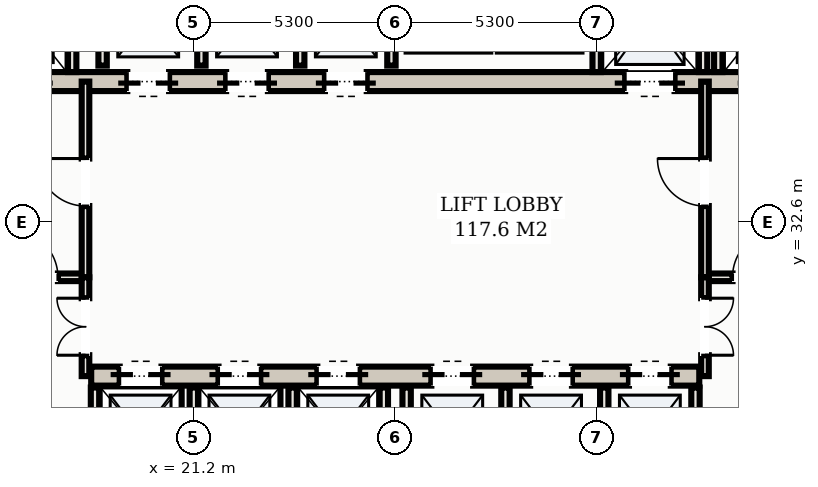
"""IFC4 building model, lengths in metres.
Left out: names, types, materials, properties, quantities, classifications, styles, units other than length and angle.
Written with IfcOpenShell. Run it as: python <this file> out.ifc"""

import sys

from ifc_helpers import new_model, si_unit, direction, frame, frame_2d, origin, place, context, subcontext, project, spatial, rectangle, extrude, element, fill, save


model = new_model("IFC4")
c1 = context("Model", 3, precision=1e-05, world=origin(), true_north=direction((0.0, 1.0)))
c2 = subcontext(c1, "Body", "Model", "MODEL_VIEW")
j1 = project(units=[si_unit("LENGTHUNIT", "METRE"), si_unit("PLANEANGLEUNIT", "RADIAN")], contexts=[c1])
p1 = place(None, origin())
s1 = spatial("IfcSite", under=j1, at=p1, CompositionType="ELEMENT")
p2 = place(p1, origin())
s2 = spatial("IfcBuilding", under=s1, at=p2, CompositionType="ELEMENT")
p3 = place(p2, origin())
s3 = spatial("IfcBuildingStorey", under=s2, at=p3, CompositionType="ELEMENT", Elevation=0.0)
p4 = place(p3, frame((15.5, 36.3, 0.0), z_axis=(0.0, 0.0, 1.0), x_axis=(1.0, 0.0, 0.0)))
e1 = element("IfcWall", 1, at=p4, inside=s3, PredefinedType="SHEAR", context=c2, shape_type="SweptSolid", body=[
    extrude(rectangle(XDim=22.0, YDim=0.5, at=frame_2d((11.0, 0.0))), origin(), (0.0, 0.0, 1.0), 4.95),
])
p5 = place(p4, frame((0.65, 0.0, 0.0)))
e2 = element("IfcOpeningElement", 2, at=p5, cuts=e1, PredefinedType="OPENING", context=c2, shape_type="SweptSolid", body=[
    extrude(rectangle(XDim=1.1, YDim=2.15, at=frame_2d((0.55, 1.075))), frame((0.0, 0.26, 0.0), z_axis=(0.0, -1.0, 0.0), x_axis=(1.0, 0.0, 0.0)), (0.0, 0.0, 1.0), 0.52),
])
p6 = place(p4, frame((20.25, 0.0, 0.0)))
e3 = element("IfcOpeningElement", 3, at=p6, cuts=e1, PredefinedType="OPENING", context=c2, shape_type="SweptSolid", body=[
    extrude(rectangle(XDim=1.1, YDim=2.15, at=frame_2d((0.55, 1.075))), frame((0.0, 0.26, 0.0), z_axis=(0.0, -1.0, 0.0), x_axis=(1.0, 0.0, 0.0)), (0.0, 0.0, 1.0), 0.52),
])
p7 = place(p4, frame((17.05, 0.0, 0.0)))
e4 = element("IfcOpeningElement", 4, at=p7, cuts=e1, PredefinedType="OPENING", context=c2, shape_type="SweptSolid", body=[
    extrude(rectangle(XDim=1.3, YDim=2.2, at=frame_2d((0.65, 1.1))), frame((0.0, 0.26, 0.0), z_axis=(0.0, -1.0, 0.0), x_axis=(1.0, 0.0, 0.0)), (0.0, 0.0, 1.0), 0.52),
])
p8 = place(p4, frame((3.95, 0.0, 0.0)))
e5 = element("IfcOpeningElement", 5, at=p8, cuts=e1, PredefinedType="OPENING", context=c2, shape_type="SweptSolid", body=[
    extrude(rectangle(XDim=1.1, YDim=2.15, at=frame_2d((0.55, 1.075))), frame((0.0, 0.26, 0.0), z_axis=(0.0, -1.0, 0.0), x_axis=(1.0, 0.0, 0.0)), (0.0, 0.0, 1.0), 0.52),
])
p9 = place(p4, frame((6.55, 0.0, 0.0)))
e6 = element("IfcOpeningElement", 6, at=p9, cuts=e1, PredefinedType="OPENING", context=c2, shape_type="SweptSolid", body=[
    extrude(rectangle(XDim=1.1, YDim=2.15, at=frame_2d((0.55, 1.075))), frame((0.0, 0.26, 0.0), z_axis=(0.0, -1.0, 0.0), x_axis=(1.0, 0.0, 0.0)), (0.0, 0.0, 1.0), 0.52),
])
p10 = place(p4, frame((9.15, 0.0, 0.0)))
e7 = element("IfcOpeningElement", 7, at=p10, cuts=e1, PredefinedType="OPENING", context=c2, shape_type="SweptSolid", body=[
    extrude(rectangle(XDim=1.1, YDim=2.15, at=frame_2d((0.55, 1.075))), frame((0.0, 0.26, 0.0), z_axis=(0.0, -1.0, 0.0), x_axis=(1.0, 0.0, 0.0)), (0.0, 0.0, 1.0), 0.52),
])
p11 = place(p3, frame((18.5, 28.55, 0.0), z_axis=(0.0, 0.0, 1.0), x_axis=(1.0, 0.0, 0.0)))
e8 = element("IfcWall", 8, at=p11, inside=s3, PredefinedType="SHEAR", context=c2, shape_type="SweptSolid", body=[
    extrude(rectangle(XDim=16.0, YDim=0.5, at=frame_2d((8.0, 0.0))), origin(), (0.0, 0.0, 1.0), 4.95),
])
p12 = place(p11, frame((0.75, 0.0, 0.0)))
e9 = element("IfcOpeningElement", 9, at=p12, cuts=e8, PredefinedType="OPENING", context=c2, shape_type="SweptSolid", body=[
    extrude(rectangle(XDim=1.1, YDim=2.15, at=frame_2d((0.55, 1.075))), frame((0.0, 0.26, 0.0), z_axis=(0.0, -1.0, 0.0), x_axis=(1.0, 0.0, 0.0)), (0.0, 0.0, 1.0), 0.52),
])
p13 = place(p11, frame((3.35, 0.0, 0.0)))
e10 = element("IfcOpeningElement", 10, at=p13, cuts=e8, PredefinedType="OPENING", context=c2, shape_type="SweptSolid", body=[
    extrude(rectangle(XDim=1.1, YDim=2.15, at=frame_2d((0.55, 1.075))), frame((0.0, 0.26, 0.0), z_axis=(0.0, -1.0, 0.0), x_axis=(1.0, 0.0, 0.0)), (0.0, 0.0, 1.0), 0.52),
])
p14 = place(p11, frame((5.95, 0.0, 0.0)))
e11 = element("IfcOpeningElement", 11, at=p14, cuts=e8, PredefinedType="OPENING", context=c2, shape_type="SweptSolid", body=[
    extrude(rectangle(XDim=1.1, YDim=2.15, at=frame_2d((0.55, 1.075))), frame((0.0, 0.26, 0.0), z_axis=(0.0, -1.0, 0.0), x_axis=(1.0, 0.0, 0.0)), (0.0, 0.0, 1.0), 0.52),
])
p15 = place(p11, frame((8.95, 0.0, 0.0)))
e12 = element("IfcOpeningElement", 12, at=p15, cuts=e8, PredefinedType="OPENING", context=c2, shape_type="SweptSolid", body=[
    extrude(rectangle(XDim=1.1, YDim=2.15, at=frame_2d((0.55, 1.075))), frame((0.0, 0.26, 0.0), z_axis=(0.0, -1.0, 0.0), x_axis=(1.0, 0.0, 0.0)), (0.0, 0.0, 1.0), 0.52),
])
p16 = place(p11, frame((11.55, 0.0, 0.0)))
e13 = element("IfcOpeningElement", 13, at=p16, cuts=e8, PredefinedType="OPENING", context=c2, shape_type="SweptSolid", body=[
    extrude(rectangle(XDim=1.1, YDim=2.15, at=frame_2d((0.55, 1.075))), frame((0.0, 0.26, 0.0), z_axis=(0.0, -1.0, 0.0), x_axis=(1.0, 0.0, 0.0)), (0.0, 0.0, 1.0), 0.52),
])
p17 = place(p11, frame((14.15, 0.0, 0.0)))
e14 = element("IfcOpeningElement", 14, at=p17, cuts=e8, PredefinedType="OPENING", context=c2, shape_type="SweptSolid", body=[
    extrude(rectangle(XDim=1.1, YDim=2.15, at=frame_2d((0.55, 1.075))), frame((0.0, 0.26, 0.0), z_axis=(0.0, -1.0, 0.0), x_axis=(1.0, 0.0, 0.0)), (0.0, 0.0, 1.0), 0.52),
])
for number, where, z_axis, x_axis in (
    (15, (18.0, 36.55, 0.0), (0.0, 0.0, 1.0), (0.0, 1.0, 0.0)),
    (16, (35.0, 36.55, 0.0), (0.0, 0.0, 1.0), (0.0, 1.0, 0.0)),
    (17, (31.8, 36.55, 0.0), (0.0, 0.0, 1.0), (0.0, 1.0, 0.0)),
    (18, (34.6, 36.55, 0.0), (0.0, 0.0, 1.0), (0.0, 1.0, 0.0)),
):
    element("IfcWall", number, at=place(p3, frame(where, z_axis=z_axis, x_axis=x_axis)), inside=s3, PredefinedType="SOLIDWALL", context=c2, shape_type="SweptSolid", body=[
        extrude(rectangle(XDim=2.93, YDim=0.22, at=frame_2d((1.465, 0.0))), origin(), (0.0, 0.0, 1.0), 4.95),
    ])
for number, where, z_axis, x_axis in (
    (19, (18.6, 25.72, 0.0), (0.0, 0.0, 1.0), (0.0, 1.0, 0.0)),
    (20, (21.2, 25.72, 0.0), (0.0, 0.0, 1.0), (0.0, 1.0, 0.0)),
    (21, (23.8, 25.72, 0.0), (0.0, 0.0, 1.0), (0.0, 1.0, 0.0)),
    (22, (26.2, 25.72, 0.0), (0.0, 0.0, 1.0), (0.0, 1.0, 0.0)),
    (23, (26.8, 25.72, 0.0), (0.0, 0.0, 1.0), (0.0, 1.0, 0.0)),
    (24, (29.4, 25.72, 0.0), (0.0, 0.0, 1.0), (0.0, 1.0, 0.0)),
    (25, (32.0, 25.72, 0.0), (0.0, 0.0, 1.0), (0.0, 1.0, 0.0)),
    (26, (34.4, 25.72, 0.0), (0.0, 0.0, 1.0), (0.0, 1.0, 0.0)),
):
    element("IfcWall", number, at=place(p3, frame(where, z_axis=z_axis, x_axis=x_axis)), inside=s3, PredefinedType="SOLIDWALL", context=c2, shape_type="SweptSolid", body=[
        extrude(rectangle(XDim=2.53, YDim=0.22, at=frame_2d((1.265, 0.0))), origin(), (0.0, 0.0, 1.0), 4.95),
    ])
for number, where, z_axis, x_axis in (
    (27, (18.8, 36.72, 0.0), (0.0, 0.0, 1.0), (0.0, 1.0, 0.0)),
    (28, (21.4, 36.72, 0.0), (0.0, 0.0, 1.0), (0.0, 1.0, 0.0)),
    (29, (24.0, 36.72, 0.0), (0.0, 0.0, 1.0), (0.0, 1.0, 0.0)),
    (30, (26.4, 36.72, 0.0), (0.0, 0.0, 1.0), (0.0, 1.0, 0.0)),
):
    element("IfcWall", number, at=place(p3, frame(where, z_axis=z_axis, x_axis=x_axis)), inside=s3, PredefinedType="SOLIDWALL", context=c2, shape_type="SweptSolid", body=[
        extrude(rectangle(XDim=2.56, YDim=0.22, at=frame_2d((1.28, 0.0))), origin(), (0.0, 0.0, 1.0), 4.95),
    ])
p18 = place(p3, frame((15.1, 31.15, 0.0), z_axis=(0.0, 0.0, 1.0), x_axis=(1.0, 0.0, 0.0)))
e31 = element("IfcWall", 31, at=p18, inside=s3, PredefinedType="PARTITIONING", context=c2, shape_type="SweptSolid", body=[
    extrude(rectangle(XDim=3.25, YDim=0.2, at=frame_2d((1.625, 0.0))), origin(), (0.0, 0.0, 1.0), 4.95),
])
p19 = place(p18, frame((1.275, 0.0, 0.0)))
e32 = element("IfcOpeningElement", 32, at=p19, cuts=e31, PredefinedType="OPENING", context=c2, shape_type="SweptSolid", body=[
    extrude(rectangle(XDim=1.25, YDim=2.2, at=frame_2d((0.625, 1.1))), frame((0.0, 0.11, 0.0), z_axis=(0.0, -1.0, 0.0), x_axis=(1.0, 0.0, 0.0)), (0.0, 0.0, 1.0), 0.22),
])
p20 = place(p3, frame((18.35, 31.15, 0.0), z_axis=(0.0, 0.0, 1.0), x_axis=(0.0, 1.0, 0.0)))
e33 = element("IfcWall", 33, at=p20, inside=s3, PredefinedType="PARTITIONING", context=c2, shape_type="SweptSolid", body=[
    extrude(rectangle(XDim=5.15, YDim=0.2, at=frame_2d((2.575, 0.0))), origin(), (0.0, 0.0, 1.0), 4.95),
])
p21 = place(p20, frame((1.875, 0.0, 0.0)))
e34 = element("IfcOpeningElement", 34, at=p21, cuts=e33, PredefinedType="OPENING", context=c2, shape_type="SweptSolid", body=[
    extrude(rectangle(XDim=1.25, YDim=2.2, at=frame_2d((0.625, 1.1))), frame((0.0, 0.11, 0.0), z_axis=(0.0, -1.0, 0.0), x_axis=(1.0, 0.0, 0.0)), (0.0, 0.0, 1.0), 0.22),
])
p22 = place(p3, frame((34.65, 31.15, 0.0), z_axis=(0.0, 0.0, 1.0), x_axis=(1.0, 0.0, 0.0)))
e35 = element("IfcWall", 35, at=p22, inside=s3, PredefinedType="PARTITIONING", context=c2, shape_type="SweptSolid", body=[
    extrude(rectangle(XDim=3.25, YDim=0.2, at=frame_2d((1.625, 0.0))), origin(), (0.0, 0.0, 1.0), 4.95),
])
p23 = place(p22, frame((0.725, 0.0, 0.0)))
e36 = element("IfcOpeningElement", 36, at=p23, cuts=e35, PredefinedType="OPENING", context=c2, shape_type="SweptSolid", body=[
    extrude(rectangle(XDim=1.25, YDim=2.2, at=frame_2d((0.625, 1.1))), frame((0.0, 0.11, 0.0), z_axis=(0.0, -1.0, 0.0), x_axis=(1.0, 0.0, 0.0)), (0.0, 0.0, 1.0), 0.22),
])
p24 = place(p3, frame((34.65, 31.15, 0.0), z_axis=(0.0, 0.0, 1.0), x_axis=(0.0, 1.0, 0.0)))
e37 = element("IfcWall", 37, at=p24, inside=s3, PredefinedType="PARTITIONING", context=c2, shape_type="SweptSolid", body=[
    extrude(rectangle(XDim=5.15, YDim=0.2, at=frame_2d((2.575, 0.0))), origin(), (0.0, 0.0, 1.0), 4.95),
])
p25 = place(p24, frame((1.875, 0.0, 0.0)))
e38 = element("IfcOpeningElement", 38, at=p25, cuts=e37, PredefinedType="OPENING", context=c2, shape_type="SweptSolid", body=[
    extrude(rectangle(XDim=1.25, YDim=2.2, at=frame_2d((0.625, 1.1))), frame((0.0, 0.11, 0.0), z_axis=(0.0, -1.0, 0.0), x_axis=(1.0, 0.0, 0.0)), (0.0, 0.0, 1.0), 0.22),
])
p26 = place(p3, frame((18.35, 28.55, 0.0), z_axis=(0.0, 0.0, 1.0), x_axis=(0.0, 1.0, 0.0)))
e39 = element("IfcWall", 39, at=p26, inside=s3, PredefinedType="PARTITIONING", context=c2, shape_type="SweptSolid", body=[
    extrude(rectangle(XDim=2.6, YDim=0.2, at=frame_2d((1.3, 0.0))), origin(), (0.0, 0.0, 1.0), 4.95),
])
p27 = place(p26, frame((0.55, 0.0, 0.0)))
e40 = element("IfcOpeningElement", 40, at=p27, cuts=e39, PredefinedType="OPENING", context=c2, shape_type="SweptSolid", body=[
    extrude(rectangle(XDim=1.5, YDim=2.25, at=frame_2d((0.75, 1.125))), frame((0.0, 0.11, 0.0), z_axis=(0.0, -1.0, 0.0), x_axis=(1.0, 0.0, 0.0)), (0.0, 0.0, 1.0), 0.22),
])
p28 = place(p3, frame((34.65, 28.55, 0.0), z_axis=(0.0, 0.0, 1.0), x_axis=(0.0, 1.0, 0.0)))
e41 = element("IfcWall", 41, at=p28, inside=s3, PredefinedType="PARTITIONING", context=c2, shape_type="SweptSolid", body=[
    extrude(rectangle(XDim=2.6, YDim=0.2, at=frame_2d((1.3, 0.0))), origin(), (0.0, 0.0, 1.0), 4.95),
])
p29 = place(p28, frame((0.55, 0.0, 0.0)))
e42 = element("IfcOpeningElement", 42, at=p29, cuts=e41, PredefinedType="OPENING", context=c2, shape_type="SweptSolid", body=[
    extrude(rectangle(XDim=1.5, YDim=2.25, at=frame_2d((0.75, 1.125))), frame((0.0, 0.11, 0.0), z_axis=(0.0, -1.0, 0.0), x_axis=(1.0, 0.0, 0.0)), (0.0, 0.0, 1.0), 0.22),
])
p30 = place(p7, frame((1.3, 0.0, 0.0), z_axis=(0.0, 0.0, 1.0), x_axis=(-1.0, 0.0, 0.0)))
e43 = element("IfcDoor", 43, at=p30, inside=s3, OperationType="DOUBLE_DOOR_SLIDING", PredefinedType="DOOR", context=c2, shape_type="SweptSolid", body=[
    extrude(rectangle(XDim=1.3, YDim=2.2, at=frame_2d((0.65, 1.1))), frame((0.0, 0.025, 0.0), z_axis=(0.0, -1.0, 0.0), x_axis=(1.0, 0.0, 0.0)), (0.0, 0.0, 1.0), 0.05),
])
fill(e4, e43)
p31 = place(p12, origin())
e44 = element("IfcDoor", 44, at=p31, inside=s3, OperationType="DOUBLE_DOOR_SLIDING", PredefinedType="DOOR", context=c2, shape_type="SweptSolid", body=[
    extrude(rectangle(XDim=1.1, YDim=2.15, at=frame_2d((0.55, 1.075))), frame((0.0, 0.025, 0.0), z_axis=(0.0, -1.0, 0.0), x_axis=(1.0, 0.0, 0.0)), (0.0, 0.0, 1.0), 0.05),
])
fill(e9, e44)
p32 = place(p13, origin())
e45 = element("IfcDoor", 45, at=p32, inside=s3, OperationType="DOUBLE_DOOR_SLIDING", PredefinedType="DOOR", context=c2, shape_type="SweptSolid", body=[
    extrude(rectangle(XDim=1.1, YDim=2.15, at=frame_2d((0.55, 1.075))), frame((0.0, 0.025, 0.0), z_axis=(0.0, -1.0, 0.0), x_axis=(1.0, 0.0, 0.0)), (0.0, 0.0, 1.0), 0.05),
])
fill(e10, e45)
p33 = place(p14, origin())
e46 = element("IfcDoor", 46, at=p33, inside=s3, OperationType="DOUBLE_DOOR_SLIDING", PredefinedType="DOOR", context=c2, shape_type="SweptSolid", body=[
    extrude(rectangle(XDim=1.1, YDim=2.15, at=frame_2d((0.55, 1.075))), frame((0.0, 0.025, 0.0), z_axis=(0.0, -1.0, 0.0), x_axis=(1.0, 0.0, 0.0)), (0.0, 0.0, 1.0), 0.05),
])
fill(e11, e46)
p34 = place(p15, origin())
e47 = element("IfcDoor", 47, at=p34, inside=s3, OperationType="DOUBLE_DOOR_SLIDING", PredefinedType="DOOR", context=c2, shape_type="SweptSolid", body=[
    extrude(rectangle(XDim=1.1, YDim=2.15, at=frame_2d((0.55, 1.075))), frame((0.0, 0.025, 0.0), z_axis=(0.0, -1.0, 0.0), x_axis=(1.0, 0.0, 0.0)), (0.0, 0.0, 1.0), 0.05),
])
fill(e12, e47)
p35 = place(p16, origin())
e48 = element("IfcDoor", 48, at=p35, inside=s3, OperationType="DOUBLE_DOOR_SLIDING", PredefinedType="DOOR", context=c2, shape_type="SweptSolid", body=[
    extrude(rectangle(XDim=1.1, YDim=2.15, at=frame_2d((0.55, 1.075))), frame((0.0, 0.025, 0.0), z_axis=(0.0, -1.0, 0.0), x_axis=(1.0, 0.0, 0.0)), (0.0, 0.0, 1.0), 0.05),
])
fill(e13, e48)
p36 = place(p17, origin())
e49 = element("IfcDoor", 49, at=p36, inside=s3, OperationType="DOUBLE_DOOR_SLIDING", PredefinedType="DOOR", context=c2, shape_type="SweptSolid", body=[
    extrude(rectangle(XDim=1.1, YDim=2.15, at=frame_2d((0.55, 1.075))), frame((0.0, 0.025, 0.0), z_axis=(0.0, -1.0, 0.0), x_axis=(1.0, 0.0, 0.0)), (0.0, 0.0, 1.0), 0.05),
])
fill(e14, e49)
p37 = place(p8, frame((1.1, 0.0, 0.0), z_axis=(0.0, 0.0, 1.0), x_axis=(-1.0, 0.0, 0.0)))
e50 = element("IfcDoor", 50, at=p37, inside=s3, OperationType="DOUBLE_DOOR_SLIDING", PredefinedType="DOOR", context=c2, shape_type="SweptSolid", body=[
    extrude(rectangle(XDim=1.1, YDim=2.15, at=frame_2d((0.55, 1.075))), frame((0.0, 0.025, 0.0), z_axis=(0.0, -1.0, 0.0), x_axis=(1.0, 0.0, 0.0)), (0.0, 0.0, 1.0), 0.05),
])
fill(e5, e50)
p38 = place(p9, frame((1.1, 0.0, 0.0), z_axis=(0.0, 0.0, 1.0), x_axis=(-1.0, 0.0, 0.0)))
e51 = element("IfcDoor", 51, at=p38, inside=s3, OperationType="DOUBLE_DOOR_SLIDING", PredefinedType="DOOR", context=c2, shape_type="SweptSolid", body=[
    extrude(rectangle(XDim=1.1, YDim=2.15, at=frame_2d((0.55, 1.075))), frame((0.0, 0.025, 0.0), z_axis=(0.0, -1.0, 0.0), x_axis=(1.0, 0.0, 0.0)), (0.0, 0.0, 1.0), 0.05),
])
fill(e6, e51)
p39 = place(p10, frame((1.1, 0.0, 0.0), z_axis=(0.0, 0.0, 1.0), x_axis=(-1.0, 0.0, 0.0)))
e52 = element("IfcDoor", 52, at=p39, inside=s3, OperationType="DOUBLE_DOOR_SLIDING", PredefinedType="DOOR", context=c2, shape_type="SweptSolid", body=[
    extrude(rectangle(XDim=1.1, YDim=2.15, at=frame_2d((0.55, 1.075))), frame((0.0, 0.025, 0.0), z_axis=(0.0, -1.0, 0.0), x_axis=(1.0, 0.0, 0.0)), (0.0, 0.0, 1.0), 0.05),
])
fill(e7, e52)
p40 = place(p19, origin())
e53 = element("IfcDoor", 53, at=p40, inside=s3, OperationType="SINGLE_SWING_LEFT", PredefinedType="DOOR", context=c2, shape_type="SweptSolid", body=[
    extrude(rectangle(XDim=1.25, YDim=2.2, at=frame_2d((0.625, 1.1))), frame((0.0, 0.025, 0.0), z_axis=(0.0, -1.0, 0.0), x_axis=(1.0, 0.0, 0.0)), (0.0, 0.0, 1.0), 0.05),
])
fill(e32, e53)
p41 = place(p21, origin())
e54 = element("IfcDoor", 54, at=p41, inside=s3, OperationType="SINGLE_SWING_RIGHT", PredefinedType="DOOR", context=c2, shape_type="SweptSolid", body=[
    extrude(rectangle(XDim=1.25, YDim=2.2, at=frame_2d((0.625, 1.1))), frame((0.0, 0.025, 0.0), z_axis=(0.0, -1.0, 0.0), x_axis=(1.0, 0.0, 0.0)), (0.0, 0.0, 1.0), 0.05),
])
fill(e34, e54)
p42 = place(p23, origin())
e55 = element("IfcDoor", 55, at=p42, inside=s3, OperationType="SINGLE_SWING_RIGHT", PredefinedType="DOOR", context=c2, shape_type="SweptSolid", body=[
    extrude(rectangle(XDim=1.25, YDim=2.2, at=frame_2d((0.625, 1.1))), frame((0.0, 0.025, 0.0), z_axis=(0.0, -1.0, 0.0), x_axis=(1.0, 0.0, 0.0)), (0.0, 0.0, 1.0), 0.05),
])
fill(e36, e55)
p43 = place(p25, origin())
e56 = element("IfcDoor", 56, at=p43, inside=s3, OperationType="SINGLE_SWING_RIGHT", PredefinedType="DOOR", context=c2, shape_type="SweptSolid", body=[
    extrude(rectangle(XDim=1.25, YDim=2.2, at=frame_2d((0.625, 1.1))), frame((0.0, 0.025, 0.0), z_axis=(0.0, -1.0, 0.0), x_axis=(1.0, 0.0, 0.0)), (0.0, 0.0, 1.0), 0.05),
])
fill(e38, e56)
p44 = place(p27, origin())
e57 = element("IfcDoor", 57, at=p44, inside=s3, OperationType="DOUBLE_DOOR_SINGLE_SWING", PredefinedType="DOOR", context=c2, shape_type="SweptSolid", body=[
    extrude(rectangle(XDim=1.5, YDim=2.25, at=frame_2d((0.75, 1.125))), frame((0.0, 0.025, 0.0), z_axis=(0.0, -1.0, 0.0), x_axis=(1.0, 0.0, 0.0)), (0.0, 0.0, 1.0), 0.05),
])
fill(e40, e57)
p45 = place(p29, frame((1.5, 0.0, 0.0), z_axis=(0.0, 0.0, 1.0), x_axis=(-1.0, 0.0, 0.0)))
e58 = element("IfcDoor", 58, at=p45, inside=s3, OperationType="DOUBLE_DOOR_SINGLE_SWING", PredefinedType="DOOR", context=c2, shape_type="SweptSolid", body=[
    extrude(rectangle(XDim=1.5, YDim=2.25, at=frame_2d((0.75, 1.125))), frame((0.0, 0.025, 0.0), z_axis=(0.0, -1.0, 0.0), x_axis=(1.0, 0.0, 0.0)), (0.0, 0.0, 1.0), 0.05),
])
fill(e42, e58)
save(model, sys.argv[1])
